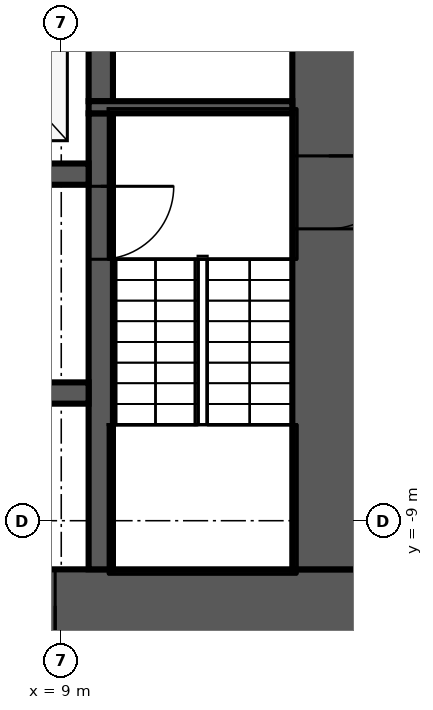
"""IFC4 building model, lengths in metres.
Left out: names, types, materials, properties, quantities, classifications, styles, units other than length and angle.
Written with IfcOpenShell. Run it as: python <this file> out.ifc"""

import sys

from ifc_helpers import new_model, si_unit, direction, frame, frame_2d, origin, place, context, subcontext, project, spatial, rectangle, extrude, element, fill, save


model = new_model("IFC4")
c1 = context("Model", 3, precision=1e-05, world=origin(), true_north=direction((0.0, 1.0)))
c2 = subcontext(c1, "Body", "Model", "MODEL_VIEW")
j1 = project(units=[si_unit("LENGTHUNIT", "METRE"), si_unit("PLANEANGLEUNIT", "RADIAN")], contexts=[c1])
p1 = place(None, origin())
s1 = spatial("IfcSite", under=j1, at=p1, CompositionType="ELEMENT")
p2 = place(p1, origin())
s2 = spatial("IfcBuilding", under=s1, at=p2, CompositionType="ELEMENT")
p3 = place(p2, origin())
s3 = spatial("IfcBuildingStorey", under=s2, at=p3, CompositionType="ELEMENT", Elevation=0.0)
p4 = place(p3, frame((14.0, -10.4, 0.0), z_axis=(0.0, 0.0, 1.0), x_axis=(-1.0, 0.0, 0.0)))
e1 = element("IfcWall", 1, at=p4, inside=s3, PredefinedType="SHEAR", context=c2, shape_type="SweptSolid", body=[
    extrude(rectangle(XDim=28.0, YDim=1.2, at=frame_2d((14.0, 0.0))), origin(), (0.0, 0.0, 1.0), 8.55),
])
p5 = place(p4, frame((5.1, 0.0, 0.0)))
e2 = element("IfcOpeningElement", 2, at=p5, cuts=e1, PredefinedType="OPENING", context=c2, shape_type="SweptSolid", body=[
    extrude(rectangle(XDim=1.6, YDim=2.1, at=frame_2d((0.8, 1.05))), frame((0.0, 0.61, 0.0), z_axis=(0.0, -1.0, 0.0), x_axis=(1.0, 0.0, 0.0)), (0.0, 0.0, 1.0), 1.22),
])
p6 = place(p3, frame((13.4, 9.8, 0.0), z_axis=(0.0, 0.0, 1.0), x_axis=(0.0, -1.0, 0.0)))
e3 = element("IfcWall", 3, at=p6, inside=s3, PredefinedType="SHEAR", context=c2, shape_type="SweptSolid", body=[
    extrude(rectangle(XDim=19.6, YDim=1.2, at=frame_2d((9.8, 0.0))), origin(), (0.0, 0.0, 1.0), 8.55),
])
p7 = place(p6, frame((5.6, 0.0, 0.0)))
e4 = element("IfcOpeningElement", 4, at=p7, cuts=e3, PredefinedType="OPENING", context=c2, shape_type="SweptSolid", body=[
    extrude(rectangle(XDim=1.2, YDim=2.1, at=frame_2d((0.6, 1.05))), frame((0.0, 0.61, 0.0), z_axis=(0.0, -1.0, 0.0), x_axis=(1.0, 0.0, 0.0)), (0.0, 0.0, 1.0), 1.22),
])
p8 = place(p6, frame((12.8, 0.0, 0.0)))
e5 = element("IfcOpeningElement", 5, at=p8, cuts=e3, PredefinedType="OPENING", context=c2, shape_type="SweptSolid", body=[
    extrude(rectangle(XDim=1.2, YDim=2.1, at=frame_2d((0.6, 1.05))), frame((0.0, 0.61, 0.0), z_axis=(0.0, -1.0, 0.0), x_axis=(1.0, 0.0, 0.0)), (0.0, 0.0, 1.0), 1.22),
])
p9 = place(p3, frame((9.65, -2.3, 0.0), z_axis=(0.0, 0.0, 1.0), x_axis=(0.0, -1.0, 0.0)))
e6 = element("IfcWall", 6, at=p9, inside=s3, PredefinedType="SHEAR", context=c2, shape_type="SweptSolid", body=[
    extrude(rectangle(XDim=7.5, YDim=0.4, at=frame_2d((3.75, 0.0))), origin(), (0.0, 0.0, 1.0), 8.55),
])
p10 = place(p9, frame((1.2, 0.0, 0.0)))
e7 = element("IfcOpeningElement", 7, at=p10, cuts=e6, PredefinedType="OPENING", context=c2, shape_type="SweptSolid", body=[
    extrude(rectangle(XDim=1.2, YDim=2.1, at=frame_2d((0.6, 1.05))), frame((0.0, 0.21, 0.0), z_axis=(0.0, -1.0, 0.0), x_axis=(1.0, 0.0, 0.0)), (0.0, 0.0, 1.0), 0.42),
])
p11 = place(p3, frame((9.65, -2.1, 0.0), z_axis=(0.0, 0.0, 1.0), x_axis=(0.0, 1.0, 0.0)))
e8 = element("IfcWall", 8, at=p11, inside=s3, PredefinedType="SHEAR", context=c2, shape_type="SweptSolid", body=[
    extrude(rectangle(XDim=2.3, YDim=0.4, at=frame_2d((1.15, 0.0))), origin(), (0.0, 0.0, 1.0), 8.55),
])
p12 = place(p3, frame((9.45, -2.2, 0.0), z_axis=(0.0, 0.0, 1.0), x_axis=(1.0, 0.0, 0.0)))
e9 = element("IfcWall", 9, at=p12, inside=s3, PredefinedType="SHEAR", context=c2, shape_type="SweptSolid", body=[
    extrude(rectangle(XDim=3.35, YDim=0.2, at=frame_2d((1.675, 0.0))), origin(), (0.0, 0.0, 1.0), 8.55),
])
p13 = place(p3, frame((-9.45, -3.3, 0.0), z_axis=(0.0, 0.0, 1.0), x_axis=(1.0, 0.0, 0.0)))
e10 = element("IfcWall", 10, at=p13, inside=s3, PredefinedType="SHEAR", context=c2, shape_type="SweptSolid", body=[
    extrude(rectangle(XDim=18.9, YDim=0.35, at=frame_2d((9.45, 0.0))), origin(), (0.0, 0.0, 1.0), 8.55),
])
p14 = place(p13, frame((11.6, 0.0, 0.0)))
e11 = element("IfcOpeningElement", 11, at=p14, cuts=e10, PredefinedType="OPENING", context=c2, shape_type="SweptSolid", body=[
    extrude(rectangle(XDim=1.1, YDim=2.1, at=frame_2d((0.55, 1.05))), frame((0.0, 0.185, 0.0), z_axis=(0.0, -1.0, 0.0), x_axis=(1.0, 0.0, 0.0)), (0.0, 0.0, 1.0), 0.37),
])
p15 = place(p13, frame((14.3, 0.0, 0.0)))
e12 = element("IfcOpeningElement", 12, at=p15, cuts=e10, PredefinedType="OPENING", context=c2, shape_type="SweptSolid", body=[
    extrude(rectangle(XDim=1.1, YDim=2.1, at=frame_2d((0.55, 1.05))), frame((0.0, 0.185, 0.0), z_axis=(0.0, -1.0, 0.0), x_axis=(1.0, 0.0, 0.0)), (0.0, 0.0, 1.0), 0.37),
])
p16 = place(p13, frame((17.0, 0.0, 0.0)))
e13 = element("IfcOpeningElement", 13, at=p16, cuts=e10, PredefinedType="OPENING", context=c2, shape_type="SweptSolid", body=[
    extrude(rectangle(XDim=1.1, YDim=2.1, at=frame_2d((0.55, 1.05))), frame((0.0, 0.185, 0.0), z_axis=(0.0, -1.0, 0.0), x_axis=(1.0, 0.0, 0.0)), (0.0, 0.0, 1.0), 0.37),
])
p17 = place(p13, frame((3.6, 0.0, 0.0)))
e14 = element("IfcOpeningElement", 14, at=p17, cuts=e10, PredefinedType="OPENING", context=c2, shape_type="SweptSolid", body=[
    extrude(rectangle(XDim=0.9, YDim=2.1, at=frame_2d((0.45, 1.05))), frame((0.0, 0.185, 0.0), z_axis=(0.0, -1.0, 0.0), x_axis=(1.0, 0.0, 0.0)), (0.0, 0.0, 1.0), 0.37),
])
p18 = place(p13, frame((9.0, 0.0, 0.0)))
e15 = element("IfcOpeningElement", 15, at=p18, cuts=e10, PredefinedType="OPENING", context=c2, shape_type="SweptSolid", body=[
    extrude(rectangle(XDim=0.9, YDim=2.1, at=frame_2d((0.45, 1.05))), frame((0.0, 0.185, 0.0), z_axis=(0.0, -1.0, 0.0), x_axis=(1.0, 0.0, 0.0)), (0.0, 0.0, 1.0), 0.37),
])
p19 = place(p3, frame((9.45, -6.9, 0.0), z_axis=(0.0, 0.0, 1.0), x_axis=(-1.0, 0.0, 0.0)))
e16 = element("IfcWall", 16, at=p19, inside=s3, PredefinedType="SHEAR", context=c2, shape_type="SweptSolid", body=[
    extrude(rectangle(XDim=18.9, YDim=0.35, at=frame_2d((9.45, 0.0))), origin(), (0.0, 0.0, 1.0), 8.55),
])
p20 = place(p19, frame((6.2, 0.0, 0.0)))
e17 = element("IfcOpeningElement", 17, at=p20, cuts=e16, PredefinedType="OPENING", context=c2, shape_type="SweptSolid", body=[
    extrude(rectangle(XDim=1.1, YDim=2.1, at=frame_2d((0.55, 1.05))), frame((0.0, 0.185, 0.0), z_axis=(0.0, -1.0, 0.0), x_axis=(1.0, 0.0, 0.0)), (0.0, 0.0, 1.0), 0.37),
])
p21 = place(p19, frame((3.5, 0.0, 0.0)))
e18 = element("IfcOpeningElement", 18, at=p21, cuts=e16, PredefinedType="OPENING", context=c2, shape_type="SweptSolid", body=[
    extrude(rectangle(XDim=1.1, YDim=2.1, at=frame_2d((0.55, 1.05))), frame((0.0, 0.185, 0.0), z_axis=(0.0, -1.0, 0.0), x_axis=(1.0, 0.0, 0.0)), (0.0, 0.0, 1.0), 0.37),
])
p22 = place(p19, frame((0.75, 0.0, 0.0)))
e19 = element("IfcOpeningElement", 19, at=p22, cuts=e16, PredefinedType="OPENING", context=c2, shape_type="SweptSolid", body=[
    extrude(rectangle(XDim=1.2, YDim=2.1, at=frame_2d((0.6, 1.05))), frame((0.0, 0.185, 0.0), z_axis=(0.0, -1.0, 0.0), x_axis=(1.0, 0.0, 0.0)), (0.0, 0.0, 1.0), 0.37),
])
p23 = place(p19, frame((17.1, 0.0, 0.0)))
e20 = element("IfcOpeningElement", 20, at=p23, cuts=e16, PredefinedType="OPENING", context=c2, shape_type="SweptSolid", body=[
    extrude(rectangle(XDim=0.9, YDim=2.1, at=frame_2d((0.45, 1.05))), frame((0.0, 0.185, 0.0), z_axis=(0.0, -1.0, 0.0), x_axis=(1.0, 0.0, 0.0)), (0.0, 0.0, 1.0), 0.37),
])
p24 = place(p19, frame((13.05, 0.0, 0.0)))
e21 = element("IfcOpeningElement", 21, at=p24, cuts=e16, PredefinedType="OPENING", context=c2, shape_type="SweptSolid", body=[
    extrude(rectangle(XDim=0.9, YDim=2.1, at=frame_2d((0.45, 1.05))), frame((0.0, 0.185, 0.0), z_axis=(0.0, -1.0, 0.0), x_axis=(1.0, 0.0, 0.0)), (0.0, 0.0, 1.0), 0.37),
])
p25 = place(p19, frame((9.0, 0.0, 0.0)))
e22 = element("IfcOpeningElement", 22, at=p25, cuts=e16, PredefinedType="OPENING", context=c2, shape_type="SweptSolid", body=[
    extrude(rectangle(XDim=0.9, YDim=2.1, at=frame_2d((0.45, 1.05))), frame((0.0, 0.185, 0.0), z_axis=(0.0, -1.0, 0.0), x_axis=(1.0, 0.0, 0.0)), (0.0, 0.0, 1.0), 0.37),
])
p26 = place(p5, origin())
e23 = element("IfcDoor", 23, at=p26, inside=s3, OperationType="DOUBLE_DOOR_SINGLE_SWING", PredefinedType="DOOR", context=c2, shape_type="SweptSolid", body=[
    extrude(rectangle(XDim=1.6, YDim=2.1, at=frame_2d((0.8, 1.05))), frame((0.0, 0.025, 0.0), z_axis=(0.0, -1.0, 0.0), x_axis=(1.0, 0.0, 0.0)), (0.0, 0.0, 1.0), 0.05),
])
fill(e2, e23)
p27 = place(p10, origin())
e24 = element("IfcDoor", 24, at=p27, inside=s3, OperationType="SINGLE_SWING_RIGHT", PredefinedType="DOOR", context=c2, shape_type="SweptSolid", body=[
    extrude(rectangle(XDim=1.2, YDim=2.1, at=frame_2d((0.6, 1.05))), frame((0.0, 0.025, 0.0), z_axis=(0.0, -1.0, 0.0), x_axis=(1.0, 0.0, 0.0)), (0.0, 0.0, 1.0), 0.05),
])
fill(e7, e24)
p28 = place(p8, origin())
e25 = element("IfcDoor", 25, at=p28, inside=s3, OperationType="SINGLE_SWING_LEFT", PredefinedType="DOOR", context=c2, shape_type="SweptSolid", body=[
    extrude(rectangle(XDim=1.2, YDim=2.1, at=frame_2d((0.6, 1.05))), frame((0.0, 0.025, 0.0), z_axis=(0.0, -1.0, 0.0), x_axis=(1.0, 0.0, 0.0)), (0.0, 0.0, 1.0), 0.05),
])
fill(e5, e25)
save(model, sys.argv[1])
